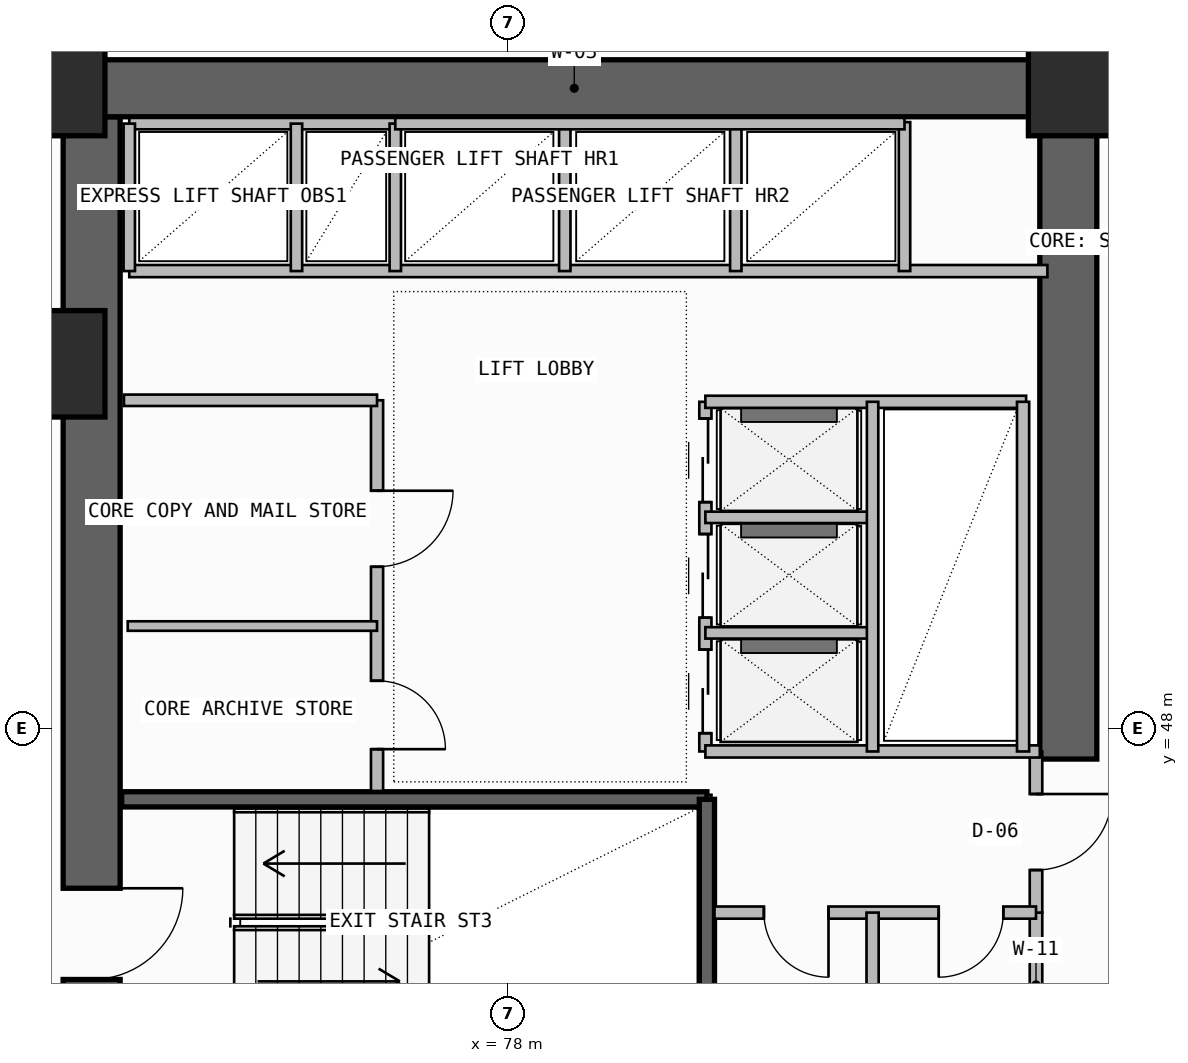
"""IFC4 building model, lengths in metres.
Left out: names, types, materials, properties, quantities, classifications, styles, units other than length and angle.
Written with IfcOpenShell. Run it as: python <this file> out.ifc"""

import sys

from ifc_helpers import new_model, si_unit, direction, frame, frame_2d, origin, origin_2d, place, context, subcontext, project, spatial, rectangle, extrude, element, fill, save


model = new_model("IFC4")
c1 = context("Model", 3, precision=1e-05, world=origin(), true_north=direction((0.0, 1.0)))
c2 = subcontext(c1, "Body", "Model", "MODEL_VIEW")
j1 = project(units=[si_unit("LENGTHUNIT", "METRE"), si_unit("PLANEANGLEUNIT", "RADIAN")], contexts=[c1])
p1 = place(None, origin())
s1 = spatial("IfcSite", under=j1, at=p1, CompositionType="ELEMENT")
p2 = place(p1, origin())
s2 = spatial("IfcBuilding", under=s1, at=p2, CompositionType="ELEMENT")
p3 = place(p2, frame((0.0, 0.0, 186.14)))
s3 = spatial("IfcBuildingStorey", under=s2, at=p3, CompositionType="ELEMENT", Elevation=186.14)
p4 = place(p3, frame((72.525, 43.35, -0.26), z_axis=(0.0, 0.0, 1.0), x_axis=(0.0, 1.0, 0.0)))
e1 = element("IfcWall", 1, at=p4, inside=s3, PredefinedType="SHEAR", context=c2, shape_type="SweptSolid", body=[
    extrude(rectangle(XDim=12.7, YDim=0.75, at=frame_2d((6.35, 0.0))), origin(), (0.0, 0.0, 1.0), 3.52),
])
p5 = place(p4, frame((1.35, 0.0, 0.26)))
e2 = element("IfcOpeningElement", 2, at=p5, cuts=e1, PredefinedType="OPENING", context=c2, shape_type="SweptSolid", body=[
    extrude(rectangle(XDim=1.2, YDim=2.2, at=frame_2d((0.6, 1.1))), frame((0.0, 0.385, 0.0), z_axis=(0.0, -1.0, 0.0), x_axis=(1.0, 0.0, 0.0)), (0.0, 0.0, 1.0), 0.77),
])
p6 = place(p3, frame((72.0, 56.425, -0.26), z_axis=(0.0, 0.0, 1.0), x_axis=(1.0, 0.0, 0.0)))
e3 = element("IfcWall", 3, at=p6, inside=s3, PredefinedType="SHEAR", context=c2, shape_type="SweptSolid", body=[
    extrude(rectangle(XDim=13.75, YDim=0.75, at=frame_2d((6.875, 0.0))), origin(), (0.0, 0.0, 1.0), 3.52),
])
p7 = place(p3, frame((85.375, 47.6, -0.26), z_axis=(0.0, 0.0, 1.0), x_axis=(0.0, 1.0, 0.0)))
e4 = element("IfcWall", 4, at=p7, inside=s3, PredefinedType="SHEAR", context=c2, shape_type="SweptSolid", body=[
    extrude(rectangle(XDim=8.45, YDim=0.75, at=frame_2d((4.225, 0.0))), origin(), (0.0, 0.0, 1.0), 3.52),
])
for number, where, z_axis, x_axis in (
    (5, (72.0, 52.8, 0.0), (0.0, 0.0, 1.0), (1.0, 0.0, 0.0)),
    (6, (72.0, 56.5, 0.0), (0.0, 0.0, 1.0), (1.0, 0.0, 0.0)),
    (7, (85.55, 56.5, 0.0), (0.0, 0.0, 1.0), (1.0, 0.0, 0.0)),
):
    element("IfcColumn", number, at=place(p3, frame(where, z_axis=z_axis, x_axis=x_axis)), inside=s3, PredefinedType="COLUMN", context=c2, shape_type="SweptSolid", body=[
        extrude(rectangle(XDim=1.4, YDim=1.4, at=origin_2d()), origin(), (0.0, 0.0, 1.0), 3.52),
    ])
p8 = place(p3, frame((72.92, 47.07, -0.26), z_axis=(0.0, 0.0, 1.0), x_axis=(1.0, 0.0, 0.0)))
e8 = element("IfcWall", 8, at=p8, inside=s3, PredefinedType="SOLIDWALL", context=c2, shape_type="SweptSolid", body=[
    extrude(rectangle(XDim=7.7, YDim=0.2, at=frame_2d((3.85, 0.0))), origin(), (0.0, 0.0, 1.0), 3.52),
])
p9 = place(p3, frame((80.62, 43.83, -0.26), z_axis=(0.0, 0.0, 1.0), x_axis=(0.0, 1.0, 0.0)))
e9 = element("IfcWall", 9, at=p9, inside=s3, PredefinedType="SOLIDWALL", context=c2, shape_type="SweptSolid", body=[
    extrude(rectangle(XDim=3.24, YDim=0.2, at=frame_2d((1.62, 0.0))), origin(), (0.0, 0.0, 1.0), 3.52),
])
p10 = place(p3, frame((84.95, 43.68, 0.0), z_axis=(0.0, 0.0, 1.0), x_axis=(0.0, 1.0, 0.0)))
e10 = element("IfcWall", 10, at=p10, inside=s3, PredefinedType="PLUMBINGWALL", context=c2, shape_type="SweptSolid", body=[
    extrude(rectangle(XDim=1.9, YDim=0.165, at=frame_2d((0.95, 0.0))), origin(), (0.0, 0.0, 1.0), 3.26),
])
p11 = place(p3, frame((84.95, 45.58, 0.0), z_axis=(0.0, 0.0, 1.0), x_axis=(0.0, 1.0, 0.0)))
e11 = element("IfcWall", 11, at=p11, inside=s3, PredefinedType="PARTITIONING", context=c2, shape_type="SweptSolid", body=[
    extrude(rectangle(XDim=2.12, YDim=0.165, at=frame_2d((1.06, 0.0))), origin(), (0.0, 0.0, 1.0), 3.26),
])
p12 = place(p11, frame((0.56, 0.0, 0.0)))
e12 = element("IfcOpeningElement", 12, at=p12, cuts=e11, PredefinedType="OPENING", context=c2, shape_type="SweptSolid", body=[
    extrude(rectangle(XDim=1.0, YDim=2.2, at=frame_2d((0.5, 1.1))), frame((0.0, 0.093, 0.0), z_axis=(0.0, -1.0, 0.0), x_axis=(1.0, 0.0, 0.0)), (0.0, 0.0, 1.0), 0.185),
])
p13 = place(p3, frame((80.72, 45.58, 0.0), z_axis=(0.0, 0.0, 1.0), x_axis=(1.0, 0.0, 0.0)))
e13 = element("IfcWall", 13, at=p13, inside=s3, PredefinedType="PLUMBINGWALL", context=c2, shape_type="SweptSolid", body=[
    extrude(rectangle(XDim=4.23, YDim=0.16, at=frame_2d((2.115, 0.0))), origin(), (0.0, 0.0, 1.0), 3.26),
])
p14 = place(p13, frame((0.65, 0.0, 0.0)))
e14 = element("IfcOpeningElement", 14, at=p14, cuts=e13, PredefinedType="OPENING", context=c2, shape_type="SweptSolid", body=[
    extrude(rectangle(XDim=0.85, YDim=2.05, at=frame_2d((0.425, 1.025))), frame((0.0, 0.09, 0.0), z_axis=(0.0, -1.0, 0.0), x_axis=(1.0, 0.0, 0.0)), (0.0, 0.0, 1.0), 0.18),
])
p15 = place(p13, frame((2.95, 0.0, 0.0)))
e15 = element("IfcOpeningElement", 15, at=p15, cuts=e13, PredefinedType="OPENING", context=c2, shape_type="SweptSolid", body=[
    extrude(rectangle(XDim=0.85, YDim=2.05, at=frame_2d((0.425, 1.025))), frame((0.0, 0.09, 0.0), z_axis=(0.0, -1.0, 0.0), x_axis=(1.0, 0.0, 0.0)), (0.0, 0.0, 1.0), 0.18),
])
p16 = place(p3, frame((82.8, 43.68, 0.0), z_axis=(0.0, 0.0, 1.0), x_axis=(0.0, 1.0, 0.0)))
e16 = element("IfcWall", 16, at=p16, inside=s3, PredefinedType="PLUMBINGWALL", context=c2, shape_type="SweptSolid", body=[
    extrude(rectangle(XDim=1.9, YDim=0.16, at=frame_2d((0.95, 0.0))), origin(), (0.0, 0.0, 1.0), 3.26),
])
p17 = place(p3, frame((76.28, 47.18, 0.0), z_axis=(0.0, 0.0, 1.0), x_axis=(0.0, 1.0, 0.0)))
e17 = element("IfcWall", 17, at=p17, inside=s3, PredefinedType="SOLIDWALL", context=c2, shape_type="SweptSolid", body=[
    extrude(rectangle(XDim=5.14, YDim=0.16, at=frame_2d((2.57, 0.0))), origin(), (0.0, 0.0, 1.0), 3.26),
])
p18 = place(p17, frame((0.55, 0.0, 0.0)))
e18 = element("IfcOpeningElement", 18, at=p18, cuts=e17, PredefinedType="OPENING", context=c2, shape_type="SweptSolid", body=[
    extrude(rectangle(XDim=0.9, YDim=2.1, at=frame_2d((0.45, 1.05))), frame((0.0, 0.09, 0.0), z_axis=(0.0, -1.0, 0.0), x_axis=(1.0, 0.0, 0.0)), (0.0, 0.0, 1.0), 0.18),
])
p19 = place(p17, frame((2.95, 0.0, 0.0)))
e19 = element("IfcOpeningElement", 19, at=p19, cuts=e17, PredefinedType="OPENING", context=c2, shape_type="SweptSolid", body=[
    extrude(rectangle(XDim=1.0, YDim=2.2, at=frame_2d((0.5, 1.1))), frame((0.0, 0.09, 0.0), z_axis=(0.0, -1.0, 0.0), x_axis=(1.0, 0.0, 0.0)), (0.0, 0.0, 1.0), 0.18),
])
p20 = place(p3, frame((72.95, 52.32, 0.0), z_axis=(0.0, 0.0, 1.0), x_axis=(1.0, 0.0, 0.0)))
e20 = element("IfcWall", 20, at=p20, inside=s3, PredefinedType="SOLIDWALL", context=c2, shape_type="SweptSolid", body=[
    extrude(rectangle(XDim=3.33, YDim=0.15, at=frame_2d((1.665, 0.0))), origin(), (0.0, 0.0, 1.0), 3.26),
])
p21 = place(p3, frame((73.0, 49.35, 0.0), z_axis=(0.0, 0.0, 1.0), x_axis=(1.0, 0.0, 0.0)))
e21 = element("IfcWall", 21, at=p21, inside=s3, PredefinedType="PARTITIONING", context=c2, shape_type="SweptSolid", body=[
    extrude(rectangle(XDim=3.28, YDim=0.125, at=frame_2d((1.64, 0.0))), origin(), (0.0, 0.0, 1.0), 3.26),
])
p22 = place(p3, frame((80.6, 47.7, 0.0), z_axis=(0.0, 0.0, 1.0), x_axis=(0.0, 1.0, 0.0)))
e22 = element("IfcWall", 22, at=p22, inside=s3, PredefinedType="SOLIDWALL", context=c2, shape_type="SweptSolid", body=[
    extrude(rectangle(XDim=4.6, YDim=0.16, at=frame_2d((2.3, 0.0))), origin(), (0.0, 0.0, 1.0), 3.26),
])
p23 = place(p22, frame((0.24, 0.0, 0.0)))
e23 = element("IfcOpeningElement", 23, at=p23, cuts=e22, PredefinedType="OPENING", context=c2, shape_type="SweptSolid", body=[
    extrude(rectangle(XDim=1.1, YDim=2.25, at=frame_2d((0.55, 1.125))), frame((0.0, 0.09, 0.0), z_axis=(0.0, -1.0, 0.0), x_axis=(1.0, 0.0, 0.0)), (0.0, 0.0, 1.0), 0.18),
])
p24 = place(p22, frame((1.76, 0.0, 0.0)))
e24 = element("IfcOpeningElement", 24, at=p24, cuts=e22, PredefinedType="OPENING", context=c2, shape_type="SweptSolid", body=[
    extrude(rectangle(XDim=1.1, YDim=2.25, at=frame_2d((0.55, 1.125))), frame((0.0, 0.09, 0.0), z_axis=(0.0, -1.0, 0.0), x_axis=(1.0, 0.0, 0.0)), (0.0, 0.0, 1.0), 0.18),
])
p25 = place(p22, frame((3.28, 0.0, 0.0)))
e25 = element("IfcOpeningElement", 25, at=p25, cuts=e22, PredefinedType="OPENING", context=c2, shape_type="SweptSolid", body=[
    extrude(rectangle(XDim=1.1, YDim=2.25, at=frame_2d((0.55, 1.125))), frame((0.0, 0.09, 0.0), z_axis=(0.0, -1.0, 0.0), x_axis=(1.0, 0.0, 0.0)), (0.0, 0.0, 1.0), 0.18),
])
p26 = place(p3, frame((80.6, 47.7, 0.0), z_axis=(0.0, 0.0, 1.0), x_axis=(1.0, 0.0, 0.0)))
e26 = element("IfcWall", 26, at=p26, inside=s3, PredefinedType="SOLIDWALL", context=c2, shape_type="SweptSolid", body=[
    extrude(rectangle(XDim=4.4, YDim=0.16, at=frame_2d((2.2, 0.0))), origin(), (0.0, 0.0, 1.0), 3.26),
])
p27 = place(p3, frame((80.6, 52.3, 0.0), z_axis=(0.0, 0.0, 1.0), x_axis=(1.0, 0.0, 0.0)))
e27 = element("IfcWall", 27, at=p27, inside=s3, PredefinedType="SOLIDWALL", context=c2, shape_type="SweptSolid", body=[
    extrude(rectangle(XDim=4.22, YDim=0.16, at=frame_2d((2.11, 0.0))), origin(), (0.0, 0.0, 1.0), 3.26),
])
for number, where, z_axis, x_axis in (
    (28, (80.6, 49.26, 0.0), (0.0, 0.0, 1.0), (1.0, 0.0, 0.0)),
    (29, (80.6, 50.78, 0.0), (0.0, 0.0, 1.0), (1.0, 0.0, 0.0)),
):
    element("IfcWall", number, at=place(p3, frame(where, z_axis=z_axis, x_axis=x_axis)), inside=s3, PredefinedType="PLUMBINGWALL", context=c2, shape_type="SweptSolid", body=[
        extrude(rectangle(XDim=2.2, YDim=0.15, at=frame_2d((1.1, 0.0))), origin(), (0.0, 0.0, 1.0), 3.26),
    ])
p28 = place(p3, frame((82.8, 47.7, 0.0), z_axis=(0.0, 0.0, 1.0), x_axis=(0.0, 1.0, 0.0)))
e30 = element("IfcWall", 30, at=p28, inside=s3, PredefinedType="PLUMBINGWALL", context=c2, shape_type="SweptSolid", body=[
    extrude(rectangle(XDim=4.6, YDim=0.15, at=frame_2d((2.3, 0.0))), origin(), (0.0, 0.0, 1.0), 3.26),
])
p29 = place(p3, frame((84.78, 47.7, 0.0), z_axis=(0.0, 0.0, 1.0), x_axis=(0.0, 1.0, 0.0)))
e31 = element("IfcWall", 31, at=p29, inside=s3, PredefinedType="SOLIDWALL", context=c2, shape_type="SweptSolid", body=[
    extrude(rectangle(XDim=4.6, YDim=0.16, at=frame_2d((2.3, 0.0))), origin(), (0.0, 0.0, 1.0), 3.26),
])
p30 = place(p3, frame((73.02, 54.02, 0.0), z_axis=(0.0, 0.0, 1.0), x_axis=(1.0, 0.0, 0.0)))
e32 = element("IfcWall", 32, at=p30, inside=s3, PredefinedType="SOLIDWALL", context=c2, shape_type="SweptSolid", body=[
    extrude(rectangle(XDim=12.08, YDim=0.16, at=frame_2d((6.04, 0.0))), origin(), (0.0, 0.0, 1.0), 3.26),
])
p31 = place(p3, frame((73.02, 55.96, 0.0), z_axis=(0.0, 0.0, 1.0), x_axis=(1.0, 0.0, 0.0)))
e33 = element("IfcWall", 33, at=p31, inside=s3, PredefinedType="SOLIDWALL", context=c2, shape_type="SweptSolid", body=[
    extrude(rectangle(XDim=3.5, YDim=0.15, at=frame_2d((1.75, 0.0))), origin(), (0.0, 0.0, 1.0), 3.26),
])
p32 = place(p3, frame((73.02, 54.02, 0.0), z_axis=(0.0, 0.0, 1.0), x_axis=(0.0, 1.0, 0.0)))
e34 = element("IfcWall", 34, at=p32, inside=s3, PredefinedType="PLUMBINGWALL", context=c2, shape_type="SweptSolid", body=[
    extrude(rectangle(XDim=1.94, YDim=0.15, at=frame_2d((0.97, 0.0))), origin(), (0.0, 0.0, 1.0), 3.26),
])
p33 = place(p3, frame((76.52, 54.02, 0.0), z_axis=(0.0, 0.0, 1.0), x_axis=(0.0, 1.0, 0.0)))
e35 = element("IfcWall", 35, at=p33, inside=s3, PredefinedType="SOLIDWALL", context=c2, shape_type="SweptSolid", body=[
    extrude(rectangle(XDim=1.94, YDim=0.15, at=frame_2d((0.97, 0.0))), origin(), (0.0, 0.0, 1.0), 3.26),
])
p34 = place(p3, frame((75.22, 54.02, 0.0), z_axis=(0.0, 0.0, 1.0), x_axis=(0.0, 1.0, 0.0)))
e36 = element("IfcWall", 36, at=p34, inside=s3, PredefinedType="PLUMBINGWALL", context=c2, shape_type="SweptSolid", body=[
    extrude(rectangle(XDim=1.94, YDim=0.15, at=frame_2d((0.97, 0.0))), origin(), (0.0, 0.0, 1.0), 3.26),
])
for number, where, z_axis, x_axis in (
    (37, (78.75, 54.02, 0.0), (0.0, 0.0, 1.0), (0.0, 1.0, 0.0)),
    (38, (81.0, 54.02, 0.0), (0.0, 0.0, 1.0), (0.0, 1.0, 0.0)),
):
    element("IfcWall", number, at=place(p3, frame(where, z_axis=z_axis, x_axis=x_axis)), inside=s3, PredefinedType="PLUMBINGWALL", context=c2, shape_type="SweptSolid", body=[
        extrude(rectangle(XDim=1.96, YDim=0.15, at=frame_2d((0.98, 0.0))), origin(), (0.0, 0.0, 1.0), 3.26),
    ])
p35 = place(p3, frame((83.22, 54.02, 0.0), z_axis=(0.0, 0.0, 1.0), x_axis=(0.0, 1.0, 0.0)))
e39 = element("IfcWall", 39, at=p35, inside=s3, PredefinedType="SOLIDWALL", context=c2, shape_type="SweptSolid", body=[
    extrude(rectangle(XDim=1.96, YDim=0.15, at=frame_2d((0.98, 0.0))), origin(), (0.0, 0.0, 1.0), 3.26),
])
p36 = place(p3, frame((76.52, 55.96, 0.0), z_axis=(0.0, 0.0, 1.0), x_axis=(1.0, 0.0, 0.0)))
e40 = element("IfcWall", 40, at=p36, inside=s3, PredefinedType="SOLIDWALL", context=c2, shape_type="SweptSolid", body=[
    extrude(rectangle(XDim=6.7, YDim=0.15, at=frame_2d((3.35, 0.0))), origin(), (0.0, 0.0, 1.0), 3.26),
])
p37 = place(p5, frame((1.2, 0.0, 0.0), z_axis=(0.0, 0.0, 1.0), x_axis=(-1.0, 0.0, 0.0)))
e41 = element("IfcDoor", 41, at=p37, inside=s3, OperationType="SINGLE_SWING_LEFT", PredefinedType="USERDEFINED", context=c2, shape_type="SweptSolid", body=[
    extrude(rectangle(XDim=1.2, YDim=2.2, at=frame_2d((0.6, 1.1))), frame((0.0, 0.025, 0.0), z_axis=(0.0, -1.0, 0.0), x_axis=(1.0, 0.0, 0.0)), (0.0, 0.0, 1.0), 0.05),
])
fill(e2, e41)
p38 = place(p12, frame((1.0, 0.0, 0.0), z_axis=(0.0, 0.0, 1.0), x_axis=(-1.0, 0.0, 0.0)))
e42 = element("IfcDoor", 42, at=p38, inside=s3, OperationType="SINGLE_SWING_LEFT", PredefinedType="DOOR", context=c2, shape_type="SweptSolid", body=[
    extrude(rectangle(XDim=1.0, YDim=2.2, at=frame_2d((0.5, 1.1))), frame((0.0, 0.025, 0.0), z_axis=(0.0, -1.0, 0.0), x_axis=(1.0, 0.0, 0.0)), (0.0, 0.0, 1.0), 0.05),
])
fill(e12, e42)
p39 = place(p14, frame((0.85, 0.0, 0.0), z_axis=(0.0, 0.0, 1.0), x_axis=(-1.0, 0.0, 0.0)))
e43 = element("IfcDoor", 43, at=p39, inside=s3, OperationType="SINGLE_SWING_LEFT", PredefinedType="DOOR", context=c2, shape_type="SweptSolid", body=[
    extrude(rectangle(XDim=0.85, YDim=2.05, at=frame_2d((0.425, 1.025))), frame((0.0, 0.025, 0.0), z_axis=(0.0, -1.0, 0.0), x_axis=(1.0, 0.0, 0.0)), (0.0, 0.0, 1.0), 0.05),
])
fill(e14, e43)
p40 = place(p15, frame((0.85, 0.0, 0.0), z_axis=(0.0, 0.0, 1.0), x_axis=(-1.0, 0.0, 0.0)))
e44 = element("IfcDoor", 44, at=p40, inside=s3, OperationType="SINGLE_SWING_RIGHT", PredefinedType="DOOR", context=c2, shape_type="SweptSolid", body=[
    extrude(rectangle(XDim=0.85, YDim=2.05, at=frame_2d((0.425, 1.025))), frame((0.0, 0.025, 0.0), z_axis=(0.0, -1.0, 0.0), x_axis=(1.0, 0.0, 0.0)), (0.0, 0.0, 1.0), 0.05),
])
fill(e15, e44)
p41 = place(p18, frame((0.9, 0.0, 0.0), z_axis=(0.0, 0.0, 1.0), x_axis=(-1.0, 0.0, 0.0)))
e45 = element("IfcDoor", 45, at=p41, inside=s3, OperationType="SINGLE_SWING_RIGHT", PredefinedType="DOOR", context=c2, shape_type="SweptSolid", body=[
    extrude(rectangle(XDim=0.9, YDim=2.1, at=frame_2d((0.45, 1.05))), frame((0.0, 0.025, 0.0), z_axis=(0.0, -1.0, 0.0), x_axis=(1.0, 0.0, 0.0)), (0.0, 0.0, 1.0), 0.05),
])
fill(e18, e45)
p42 = place(p19, frame((1.0, 0.0, 0.0), z_axis=(0.0, 0.0, 1.0), x_axis=(-1.0, 0.0, 0.0)))
e46 = element("IfcDoor", 46, at=p42, inside=s3, OperationType="SINGLE_SWING_LEFT", PredefinedType="DOOR", context=c2, shape_type="SweptSolid", body=[
    extrude(rectangle(XDim=1.0, YDim=2.2, at=frame_2d((0.5, 1.1))), frame((0.0, 0.025, 0.0), z_axis=(0.0, -1.0, 0.0), x_axis=(1.0, 0.0, 0.0)), (0.0, 0.0, 1.0), 0.05),
])
fill(e19, e46)
p43 = place(p23, frame((1.1, 0.0, 0.0), z_axis=(0.0, 0.0, 1.0), x_axis=(-1.0, 0.0, 0.0)))
e47 = element("IfcDoor", 47, at=p43, inside=s3, OperationType="DOUBLE_DOOR_SLIDING", PredefinedType="DOOR", context=c2, shape_type="SweptSolid", body=[
    extrude(rectangle(XDim=1.1, YDim=2.25, at=frame_2d((0.55, 1.125))), frame((0.0, 0.025, 0.0), z_axis=(0.0, -1.0, 0.0), x_axis=(1.0, 0.0, 0.0)), (0.0, 0.0, 1.0), 0.05),
])
fill(e23, e47)
p44 = place(p24, frame((1.1, 0.0, 0.0), z_axis=(0.0, 0.0, 1.0), x_axis=(-1.0, 0.0, 0.0)))
e48 = element("IfcDoor", 48, at=p44, inside=s3, OperationType="DOUBLE_DOOR_SLIDING", PredefinedType="DOOR", context=c2, shape_type="SweptSolid", body=[
    extrude(rectangle(XDim=1.1, YDim=2.25, at=frame_2d((0.55, 1.125))), frame((0.0, 0.025, 0.0), z_axis=(0.0, -1.0, 0.0), x_axis=(1.0, 0.0, 0.0)), (0.0, 0.0, 1.0), 0.05),
])
fill(e24, e48)
p45 = place(p25, frame((1.1, 0.0, 0.0), z_axis=(0.0, 0.0, 1.0), x_axis=(-1.0, 0.0, 0.0)))
e49 = element("IfcDoor", 49, at=p45, inside=s3, OperationType="DOUBLE_DOOR_SLIDING", PredefinedType="DOOR", context=c2, shape_type="SweptSolid", body=[
    extrude(rectangle(XDim=1.1, YDim=2.25, at=frame_2d((0.55, 1.125))), frame((0.0, 0.025, 0.0), z_axis=(0.0, -1.0, 0.0), x_axis=(1.0, 0.0, 0.0)), (0.0, 0.0, 1.0), 0.05),
])
fill(e25, e49)
save(model, sys.argv[1])
